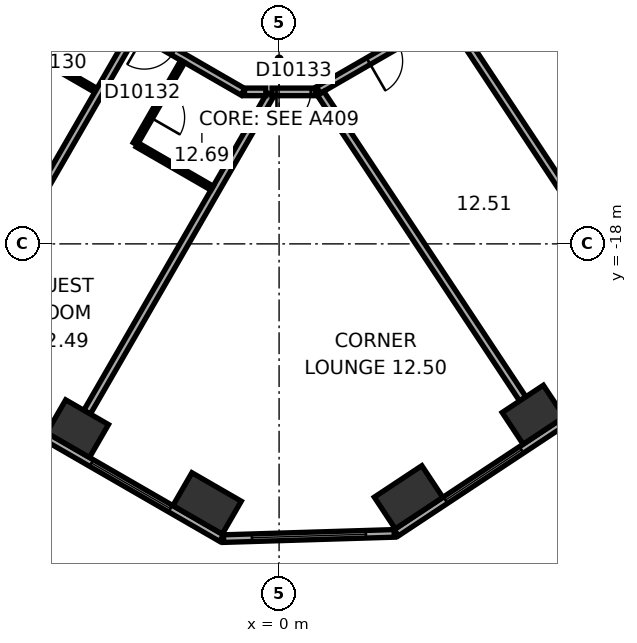
"""IFC4 building model, lengths in metres.
Left out: names, types, materials, properties, quantities, classifications, styles, units other than length and angle.
Written with IfcOpenShell. Run it as: python <this file> out.ifc"""

import sys

from ifc_helpers import new_model, si_unit, direction, frame, frame_2d, origin, origin_2d, place, context, subcontext, project, spatial, rectangle, extrude, element, fill, save


model = new_model("IFC4")
c1 = context("Model", 3, precision=1e-05, world=origin(), true_north=direction((0.0, 1.0)))
c2 = subcontext(c1, "Body", "Model", "MODEL_VIEW")
j1 = project(units=[si_unit("LENGTHUNIT", "METRE"), si_unit("PLANEANGLEUNIT", "RADIAN")], contexts=[c1])
p1 = place(None, origin())
s1 = spatial("IfcSite", under=j1, at=p1, CompositionType="ELEMENT")
p2 = place(p1, origin())
s2 = spatial("IfcBuilding", under=s1, at=p2, CompositionType="ELEMENT")
p3 = place(p2, frame((0.0, 0.0, 60.5)))
s3 = spatial("IfcBuildingStorey", under=s2, at=p3, CompositionType="ELEMENT", Elevation=60.5)
p4 = place(p3, frame((-5.302, -22.862, 0.0), z_axis=(0.0, 0.0, 1.0), x_axis=(0.866025403784, -0.5, 0.0)))
e1 = element("IfcColumn", 1, at=p4, inside=s3, PredefinedType="COLUMN", context=c2, shape_type="SweptSolid", body=[
    extrude(rectangle(XDim=1.3, YDim=1.0, at=origin_2d()), origin(), (0.0, 0.0, 1.0), 3.3),
])
for number, where, z_axis, x_axis in (
    (2, (-1.895, -24.829, 0.0), (0.0, 0.0, 1.0), (0.866, -0.5, 0.0)),
    (3, (3.407, -24.667, 0.0), (0.0, 0.0, 1.0), (0.834, 0.552, 0.0)),
):
    element("IfcColumn", number, at=place(p3, frame(where, z_axis=z_axis, x_axis=x_axis)), inside=s3, PredefinedType="COLUMN", context=c2, shape_type="SweptSolid", body=[
        extrude(rectangle(XDim=1.5, YDim=1.0, at=origin_2d()), origin(), (0.0, 0.0, 1.0), 3.3),
    ])
p5 = place(p3, frame((6.688, -22.496, 0.0), z_axis=(0.0, 0.0, 1.0), x_axis=(0.833885822067, 0.551936985312, 0.0)))
e4 = element("IfcColumn", 4, at=p5, inside=s3, PredefinedType="COLUMN", context=c2, shape_type="SweptSolid", body=[
    extrude(rectangle(XDim=1.3, YDim=1.0, at=origin_2d()), origin(), (0.0, 0.0, 1.0), 3.3),
])
p6 = place(p3, frame((-19.914, -15.119, 0.0), z_axis=(0.0, 0.0, 1.0), x_axis=(0.866025418898, -0.499999973822, 0.0)))
e5 = element("IfcWall", 5, at=p6, inside=s3, PredefinedType="STANDARD", context=c2, shape_type="SweptSolid", body=[
    extrude(rectangle(XDim=21.246, YDim=0.2, at=frame_2d((10.623, 0.0))), origin(), (0.0, 0.0, 1.0), 3.3),
])
p7 = place(p6, frame((1.555, 0.0, 0.8)))
e6 = element("IfcOpeningElement", 6, at=p7, cuts=e5, PredefinedType="OPENING", context=c2, shape_type="SweptSolid", body=[
    extrude(rectangle(XDim=2.4, YDim=1.7, at=frame_2d((1.2, 0.85))), frame((0.0, 0.11, 0.0), z_axis=(0.0, -1.0, 0.0), x_axis=(1.0, 0.0, 0.0)), (0.0, 0.0, 1.0), 0.22),
])
p8 = place(p6, frame((5.489, 0.0, 0.8)))
e7 = element("IfcOpeningElement", 7, at=p8, cuts=e5, PredefinedType="OPENING", context=c2, shape_type="SweptSolid", body=[
    extrude(rectangle(XDim=2.4, YDim=1.7, at=frame_2d((1.2, 0.85))), frame((0.0, 0.11, 0.0), z_axis=(0.0, -1.0, 0.0), x_axis=(1.0, 0.0, 0.0)), (0.0, 0.0, 1.0), 0.22),
])
p9 = place(p6, frame((9.424, 0.0, 0.8)))
e8 = element("IfcOpeningElement", 8, at=p9, cuts=e5, PredefinedType="OPENING", context=c2, shape_type="SweptSolid", body=[
    extrude(rectangle(XDim=2.4, YDim=1.7, at=frame_2d((1.2, 0.85))), frame((0.0, 0.11, 0.0), z_axis=(0.0, -1.0, 0.0), x_axis=(1.0, 0.0, 0.0)), (0.0, 0.0, 1.0), 0.22),
])
p10 = place(p6, frame((13.358, 0.0, 0.8)))
e9 = element("IfcOpeningElement", 9, at=p10, cuts=e5, PredefinedType="OPENING", context=c2, shape_type="SweptSolid", body=[
    extrude(rectangle(XDim=2.4, YDim=1.7, at=frame_2d((1.2, 0.85))), frame((0.0, 0.11, 0.0), z_axis=(0.0, -1.0, 0.0), x_axis=(1.0, 0.0, 0.0)), (0.0, 0.0, 1.0), 0.22),
])
p11 = place(p6, frame((17.293, 0.0, 0.8)))
e10 = element("IfcOpeningElement", 10, at=p11, cuts=e5, PredefinedType="OPENING", context=c2, shape_type="SweptSolid", body=[
    extrude(rectangle(XDim=2.4, YDim=1.7, at=frame_2d((1.2, 0.85))), frame((0.0, 0.11, 0.0), z_axis=(0.0, -1.0, 0.0), x_axis=(1.0, 0.0, 0.0)), (0.0, 0.0, 1.0), 0.22),
])
p12 = place(p3, frame((-1.461, -25.755, 0.0), z_axis=(0.0, 0.0, 1.0), x_axis=(0.999533823446, 0.030530898895, 0.0)))
e11 = element("IfcWall", 11, at=p12, inside=s3, PredefinedType="STANDARD", context=c2, shape_type="SweptSolid", body=[
    extrude(rectangle(XDim=4.494, YDim=0.2, at=frame_2d((2.247, 0.0))), origin(), (0.0, 0.0, 1.0), 3.3),
])
p13 = place(p12, frame((0.747, 0.0, 0.8)))
e12 = element("IfcOpeningElement", 12, at=p13, cuts=e11, PredefinedType="OPENING", context=c2, shape_type="SweptSolid", body=[
    extrude(rectangle(XDim=3.0, YDim=1.7, at=frame_2d((1.5, 0.85))), frame((0.0, 0.11, 0.0), z_axis=(0.0, -1.0, 0.0), x_axis=(1.0, 0.0, 0.0)), (0.0, 0.0, 1.0), 0.22),
])
p14 = place(p3, frame((3.083, -25.601, 0.0), z_axis=(0.0, 0.0, 1.0), x_axis=(0.833884295743, 0.551939291329, 0.0)))
e13 = element("IfcWall", 13, at=p14, inside=s3, PredefinedType="STANDARD", context=c2, shape_type="SweptSolid", body=[
    extrude(rectangle(XDim=21.246, YDim=0.2, at=frame_2d((10.623, 0.0))), origin(), (0.0, 0.0, 1.0), 3.3),
])
p15 = place(p14, frame((1.553, 0.0, 0.8)))
e14 = element("IfcOpeningElement", 14, at=p15, cuts=e13, PredefinedType="OPENING", context=c2, shape_type="SweptSolid", body=[
    extrude(rectangle(XDim=2.4, YDim=1.7, at=frame_2d((1.2, 0.85))), frame((0.0, 0.11, 0.0), z_axis=(0.0, -1.0, 0.0), x_axis=(1.0, 0.0, 0.0)), (0.0, 0.0, 1.0), 0.22),
])
p16 = place(p14, frame((5.488, 0.0, 0.8)))
e15 = element("IfcOpeningElement", 15, at=p16, cuts=e13, PredefinedType="OPENING", context=c2, shape_type="SweptSolid", body=[
    extrude(rectangle(XDim=2.4, YDim=1.7, at=frame_2d((1.2, 0.85))), frame((0.0, 0.11, 0.0), z_axis=(0.0, -1.0, 0.0), x_axis=(1.0, 0.0, 0.0)), (0.0, 0.0, 1.0), 0.22),
])
p17 = place(p14, frame((9.422, 0.0, 0.8)))
e16 = element("IfcOpeningElement", 16, at=p17, cuts=e13, PredefinedType="OPENING", context=c2, shape_type="SweptSolid", body=[
    extrude(rectangle(XDim=2.4, YDim=1.7, at=frame_2d((1.2, 0.85))), frame((0.0, 0.11, 0.0), z_axis=(0.0, -1.0, 0.0), x_axis=(1.0, 0.0, 0.0)), (0.0, 0.0, 1.0), 0.22),
])
p18 = place(p14, frame((13.357, 0.0, 0.8)))
e17 = element("IfcOpeningElement", 17, at=p18, cuts=e13, PredefinedType="OPENING", context=c2, shape_type="SweptSolid", body=[
    extrude(rectangle(XDim=2.4, YDim=1.7, at=frame_2d((1.2, 0.85))), frame((0.0, 0.11, 0.0), z_axis=(0.0, -1.0, 0.0), x_axis=(1.0, 0.0, 0.0)), (0.0, 0.0, 1.0), 0.22),
])
p19 = place(p14, frame((17.291, 0.0, 0.8)))
e18 = element("IfcOpeningElement", 18, at=p19, cuts=e13, PredefinedType="OPENING", context=c2, shape_type="SweptSolid", body=[
    extrude(rectangle(XDim=2.4, YDim=1.7, at=frame_2d((1.2, 0.85))), frame((0.0, 0.11, 0.0), z_axis=(0.0, -1.0, 0.0), x_axis=(1.0, 0.0, 0.0)), (0.0, 0.0, 1.0), 0.22),
])
p20 = place(p3, frame((-11.615, -7.843, 0.0), z_axis=(0.0, 0.0, 1.0), x_axis=(0.866026466995, -0.499998158461, 0.0)))
e19 = element("IfcWall", 19, at=p20, inside=s3, PredefinedType="PARTITIONING", context=c2, shape_type="SweptSolid", body=[
    extrude(rectangle(XDim=12.315, YDim=0.2, at=frame_2d((6.158, 0.0))), origin(), (0.0, 0.0, 1.0), 3.05),
])
p21 = place(p20, frame((4.608, 0.0, 0.0)))
e20 = element("IfcOpeningElement", 20, at=p21, cuts=e19, PredefinedType="OPENING", context=c2, shape_type="SweptSolid", body=[
    extrude(rectangle(XDim=1.0, YDim=2.1, at=frame_2d((0.5, 1.05))), frame((0.0, 0.11, 0.0), z_axis=(0.0, -1.0, 0.0), x_axis=(1.0, 0.0, 0.0)), (0.0, 0.0, 1.0), 0.22),
])
p22 = place(p20, frame((9.317, 0.0, 0.0)))
e21 = element("IfcOpeningElement", 21, at=p22, cuts=e19, PredefinedType="OPENING", context=c2, shape_type="SweptSolid", body=[
    extrude(rectangle(XDim=0.9, YDim=2.1, at=frame_2d((0.45, 1.05))), frame((0.0, 0.11, 0.0), z_axis=(0.0, -1.0, 0.0), x_axis=(1.0, 0.0, 0.0)), (0.0, 0.0, 1.0), 0.22),
])
p23 = place(p3, frame((-11.463, -10.125, 0.0), z_axis=(0.0, 0.0, 1.0), x_axis=(0.866014882148, -0.500018223566, 0.0)))
e22 = element("IfcWall", 22, at=p23, inside=s3, PredefinedType="PARTITIONING", context=c2, shape_type="SweptSolid", body=[
    extrude(rectangle(XDim=7.669, YDim=0.12, at=frame_2d((3.834, 0.0))), origin(), (0.0, 0.0, 1.0), 3.05),
])
p24 = place(p23, frame((0.55, 0.0, 0.0)))
e23 = element("IfcOpeningElement", 23, at=p24, cuts=e22, PredefinedType="OPENING", context=c2, shape_type="SweptSolid", body=[
    extrude(rectangle(XDim=1.0, YDim=2.1, at=frame_2d((0.5, 1.05))), frame((0.0, 0.07, 0.0), z_axis=(0.0, -1.0, 0.0), x_axis=(1.0, 0.0, 0.0)), (0.0, 0.0, 1.0), 0.14),
])
p25 = place(p23, frame((2.7, 0.0, 0.0)))
e24 = element("IfcOpeningElement", 24, at=p25, cuts=e22, PredefinedType="OPENING", context=c2, shape_type="SweptSolid", body=[
    extrude(rectangle(XDim=0.9, YDim=2.1, at=frame_2d((0.45, 1.05))), frame((0.0, 0.07, 0.0), z_axis=(0.0, -1.0, 0.0), x_axis=(1.0, 0.0, 0.0)), (0.0, 0.0, 1.0), 0.14),
])
p26 = place(p23, frame((5.485, 0.0, 0.0)))
e25 = element("IfcOpeningElement", 25, at=p26, cuts=e22, PredefinedType="OPENING", context=c2, shape_type="SweptSolid", body=[
    extrude(rectangle(XDim=0.9, YDim=2.1, at=frame_2d((0.45, 1.05))), frame((0.0, 0.07, 0.0), z_axis=(0.0, -1.0, 0.0), x_axis=(1.0, 0.0, 0.0)), (0.0, 0.0, 1.0), 0.14),
])
p27 = place(p3, frame((-8.46, -20.461, 0.0), z_axis=(0.0, 0.0, 1.0), x_axis=(0.499999662836, 0.866025598446, 0.0)))
e26 = element("IfcWall", 26, at=p27, inside=s3, PredefinedType="PARTITIONING", context=c2, shape_type="SweptSolid", body=[
    extrude(rectangle(XDim=9.25, YDim=0.2, at=frame_2d((4.625, 0.0))), origin(), (0.0, 0.0, 1.0), 3.05),
])
p28 = place(p3, frame((-5.052, -22.429, 0.0), z_axis=(0.0, 0.0, 1.0), x_axis=(0.50000569793, 0.866022114058, 0.0)))
e27 = element("IfcWall", 27, at=p28, inside=s3, PredefinedType="PARTITIONING", context=c2, shape_type="SweptSolid", body=[
    extrude(rectangle(XDim=9.65, YDim=0.2, at=frame_2d((4.825, 0.0))), origin(), (0.0, 0.0, 1.0), 3.05),
])
p29 = place(p3, frame((-3.786, -15.366, 0.0), z_axis=(0.0, 0.0, 1.0), x_axis=(0.500004234368, 0.866022959057, 0.0)))
e28 = element("IfcWall", 28, at=p29, inside=s3, PredefinedType="PARTITIONING", context=c2, shape_type="SweptSolid", body=[
    extrude(rectangle(XDim=2.5, YDim=0.12, at=frame_2d((1.25, 0.0))), origin(), (0.0, 0.0, 1.0), 3.05),
])
p30 = place(p29, frame((0.8, 0.0, 0.0)))
e29 = element("IfcOpeningElement", 29, at=p30, cuts=e28, PredefinedType="OPENING", context=c2, shape_type="SweptSolid", body=[
    extrude(rectangle(XDim=0.9, YDim=2.1, at=frame_2d((0.45, 1.05))), frame((0.0, 0.07, 0.0), z_axis=(0.0, -1.0, 0.0), x_axis=(1.0, 0.0, 0.0)), (0.0, 0.0, 1.0), 0.14),
])
p31 = place(p3, frame((-1.764, -16.533, 0.0), z_axis=(0.0, 0.0, 1.0), x_axis=(-0.866008641419, 0.500029032144, 0.0)))
e30 = element("IfcWall", 30, at=p31, inside=s3, PredefinedType="PARTITIONING", context=c2, shape_type="SweptSolid", body=[
    extrude(rectangle(XDim=2.275, YDim=0.12, at=frame_2d((1.137, 0.0))), origin(), (0.0, 0.0, 1.0), 3.05),
])
p32 = place(p3, frame((-0.91, -14.001, 0.0), z_axis=(0.0, 0.0, 1.0), x_axis=(1.0, 0.0, 0.0)))
e31 = element("IfcWall", 31, at=p32, inside=s3, PredefinedType="PARTITIONING", context=c2, shape_type="SweptSolid", body=[
    extrude(rectangle(XDim=0.56, YDim=0.2, at=frame_2d((0.28, 0.0))), origin(), (0.0, 0.0, 1.0), 3.05),
])
p33 = place(p3, frame((-0.186, -14.001, 0.0), z_axis=(0.0, 0.0, 1.0), x_axis=(1.0, 0.0, 0.0)))
e32 = element("IfcWall", 32, at=p33, inside=s3, PredefinedType="PARTITIONING", context=c2, shape_type="SweptSolid", body=[
    extrude(rectangle(XDim=1.136, YDim=0.2, at=frame_2d((0.568, 0.0))), origin(), (0.0, 0.0, 1.0), 3.05),
])
p34 = place(p33, frame((0.118, 0.0, 0.0)))
e33 = element("IfcOpeningElement", 33, at=p34, cuts=e32, PredefinedType="OPENING", context=c2, shape_type="SweptSolid", body=[
    extrude(rectangle(XDim=0.9, YDim=2.1, at=frame_2d((0.45, 1.05))), frame((0.0, 0.11, 0.0), z_axis=(0.0, -1.0, 0.0), x_axis=(1.0, 0.0, 0.0)), (0.0, 0.0, 1.0), 0.22),
])
p35 = place(p3, frame((1.033, -13.953, 0.0), z_axis=(0.0, 0.0, 1.0), x_axis=(0.866017531406, 0.500013635111, 0.0)))
e34 = element("IfcWall", 34, at=p35, inside=s3, PredefinedType="PARTITIONING", context=c2, shape_type="SweptSolid", body=[
    extrude(rectangle(XDim=6.58, YDim=0.2, at=frame_2d((3.29, 0.0))), origin(), (0.0, 0.0, 1.0), 3.05),
])
p36 = place(p35, frame((1.521, 0.0, 0.0)))
e35 = element("IfcOpeningElement", 35, at=p36, cuts=e34, PredefinedType="OPENING", context=c2, shape_type="SweptSolid", body=[
    extrude(rectangle(XDim=0.9, YDim=2.1, at=frame_2d((0.45, 1.05))), frame((0.0, 0.11, 0.0), z_axis=(0.0, -1.0, 0.0), x_axis=(1.0, 0.0, 0.0)), (0.0, 0.0, 1.0), 0.22),
])
p37 = place(p35, frame((4.811, 0.0, 0.0)))
e36 = element("IfcOpeningElement", 36, at=p37, cuts=e34, PredefinedType="OPENING", context=c2, shape_type="SweptSolid", body=[
    extrude(rectangle(XDim=0.9, YDim=2.1, at=frame_2d((0.45, 1.05))), frame((0.0, 0.11, 0.0), z_axis=(0.0, -1.0, 0.0), x_axis=(1.0, 0.0, 0.0)), (0.0, 0.0, 1.0), 0.22),
])
p38 = place(p3, frame((6.412, -22.079, 0.0), z_axis=(0.0, 0.0, 1.0), x_axis=(-0.551919507115, 0.83389739037, 0.0)))
e37 = element("IfcWall", 37, at=p38, inside=s3, PredefinedType="PARTITIONING", context=c2, shape_type="SweptSolid", body=[
    extrude(rectangle(XDim=9.635, YDim=0.2, at=frame_2d((4.817, 0.0))), origin(), (0.0, 0.0, 1.0), 3.05),
])
p39 = place(p3, frame((8.733, -14.127, 0.0), z_axis=(0.0, 0.0, 1.0), x_axis=(-0.499978132246, 0.86603802877, 0.0)))
e38 = element("IfcWall", 38, at=p39, inside=s3, PredefinedType="PARTITIONING", context=c2, shape_type="SweptSolid", body=[
    extrude(rectangle(XDim=2.921, YDim=0.12, at=frame_2d((1.46, 0.0))), origin(), (0.0, 0.0, 1.0), 3.05),
])
p40 = place(p39, frame((1.01, 0.0, 0.0)))
e39 = element("IfcOpeningElement", 39, at=p40, cuts=e38, PredefinedType="OPENING", context=c2, shape_type="SweptSolid", body=[
    extrude(rectangle(XDim=0.9, YDim=2.1, at=frame_2d((0.45, 1.05))), frame((0.0, 0.07, 0.0), z_axis=(0.0, -1.0, 0.0), x_axis=(1.0, 0.0, 0.0)), (0.0, 0.0, 1.0), 0.14),
])
p41 = place(p3, frame((9.693, -19.907, 0.0), z_axis=(0.0, 0.0, 1.0), x_axis=(-0.551938394837, 0.833884889121, 0.0)))
e40 = element("IfcWall", 40, at=p41, inside=s3, PredefinedType="PARTITIONING", context=c2, shape_type="SweptSolid", body=[
    extrude(rectangle(XDim=9.394, YDim=0.2, at=frame_2d((4.697, 0.0))), origin(), (0.0, 0.0, 1.0), 2.6),
])
p42 = place(p11, origin())
e41 = element("IfcWindow", 41, at=p42, inside=s3, PartitioningType="SINGLE_PANEL", PredefinedType="WINDOW", context=c2, shape_type="SweptSolid", body=[
    extrude(rectangle(XDim=2.4, YDim=1.7, at=frame_2d((1.2, 0.85))), frame((0.0, 0.03, 0.0), z_axis=(0.0, -1.0, 0.0), x_axis=(1.0, 0.0, 0.0)), (0.0, 0.0, 1.0), 0.06),
])
fill(e10, e41)
p43 = place(p13, origin())
e42 = element("IfcWindow", 42, at=p43, inside=s3, PartitioningType="SINGLE_PANEL", PredefinedType="WINDOW", context=c2, shape_type="SweptSolid", body=[
    extrude(rectangle(XDim=3.0, YDim=1.7, at=frame_2d((1.5, 0.85))), frame((0.0, 0.03, 0.0), z_axis=(0.0, -1.0, 0.0), x_axis=(1.0, 0.0, 0.0)), (0.0, 0.0, 1.0), 0.06),
])
fill(e12, e42)
p44 = place(p15, origin())
e43 = element("IfcWindow", 43, at=p44, inside=s3, PartitioningType="SINGLE_PANEL", PredefinedType="WINDOW", context=c2, shape_type="SweptSolid", body=[
    extrude(rectangle(XDim=2.4, YDim=1.7, at=frame_2d((1.2, 0.85))), frame((0.0, 0.03, 0.0), z_axis=(0.0, -1.0, 0.0), x_axis=(1.0, 0.0, 0.0)), (0.0, 0.0, 1.0), 0.06),
])
fill(e14, e43)
p45 = place(p26, origin())
e44 = element("IfcDoor", 44, at=p45, inside=s3, OperationType="SINGLE_SWING_LEFT", PredefinedType="DOOR", context=c2, shape_type="SweptSolid", body=[
    extrude(rectangle(XDim=0.9, YDim=2.1, at=frame_2d((0.45, 1.05))), frame((0.0, 0.025, 0.0), z_axis=(0.0, -1.0, 0.0), x_axis=(1.0, 0.0, 0.0)), (0.0, 0.0, 1.0), 0.05),
])
fill(e25, e44)
p46 = place(p22, origin())
e45 = element("IfcDoor", 45, at=p46, inside=s3, OperationType="SINGLE_SWING_LEFT", PredefinedType="DOOR", context=c2, shape_type="SweptSolid", body=[
    extrude(rectangle(XDim=0.9, YDim=2.1, at=frame_2d((0.45, 1.05))), frame((0.0, 0.025, 0.0), z_axis=(0.0, -1.0, 0.0), x_axis=(1.0, 0.0, 0.0)), (0.0, 0.0, 1.0), 0.05),
])
fill(e21, e45)
p47 = place(p30, origin())
e46 = element("IfcDoor", 46, at=p47, inside=s3, OperationType="SINGLE_SWING_LEFT", PredefinedType="DOOR", context=c2, shape_type="SweptSolid", body=[
    extrude(rectangle(XDim=0.9, YDim=2.1, at=frame_2d((0.45, 1.05))), frame((0.0, 0.025, 0.0), z_axis=(0.0, -1.0, 0.0), x_axis=(1.0, 0.0, 0.0)), (0.0, 0.0, 1.0), 0.05),
])
fill(e29, e46)
p48 = place(p34, origin())
e47 = element("IfcDoor", 47, at=p48, inside=s3, OperationType="SINGLE_SWING_LEFT", PredefinedType="DOOR", context=c2, shape_type="SweptSolid", body=[
    extrude(rectangle(XDim=0.9, YDim=2.1, at=frame_2d((0.45, 1.05))), frame((0.0, 0.025, 0.0), z_axis=(0.0, -1.0, 0.0), x_axis=(1.0, 0.0, 0.0)), (0.0, 0.0, 1.0), 0.05),
])
fill(e33, e47)
p49 = place(p36, origin())
e48 = element("IfcDoor", 48, at=p49, inside=s3, OperationType="SINGLE_SWING_LEFT", PredefinedType="DOOR", context=c2, shape_type="SweptSolid", body=[
    extrude(rectangle(XDim=0.9, YDim=2.1, at=frame_2d((0.45, 1.05))), frame((0.0, 0.025, 0.0), z_axis=(0.0, -1.0, 0.0), x_axis=(1.0, 0.0, 0.0)), (0.0, 0.0, 1.0), 0.05),
])
fill(e35, e48)
save(model, sys.argv[1])
